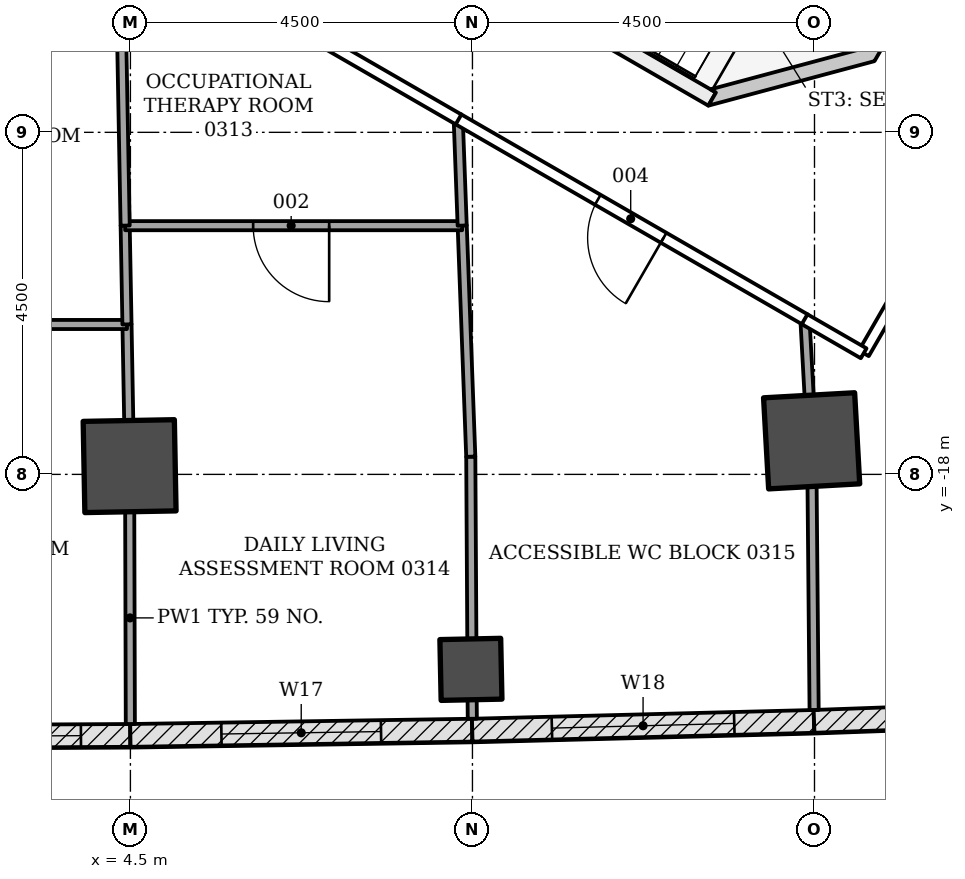
"""IFC4 building model, lengths in metres.
Left out: names, types, materials, properties, quantities, classifications, styles, units other than length and angle.
Written with IfcOpenShell. Run it as: python <this file> out.ifc"""

import sys

from ifc_helpers import new_model, si_unit, direction, frame, frame_2d, origin, origin_2d, place, context, subcontext, project, spatial, polyline, rectangle, outline, extrude, element, fill, save


model = new_model("IFC4")
c1 = context("Model", 3, precision=1e-05, world=origin(), true_north=direction((0.0, 1.0)))
c2 = subcontext(c1, "Body", "Model", "MODEL_VIEW")
j1 = project(units=[si_unit("LENGTHUNIT", "METRE"), si_unit("PLANEANGLEUNIT", "RADIAN")], contexts=[c1])
p1 = place(None, origin())
s1 = spatial("IfcSite", under=j1, at=p1, CompositionType="ELEMENT")
p2 = place(p1, origin())
s2 = spatial("IfcBuilding", under=s1, at=p2, CompositionType="ELEMENT")
p3 = place(p2, frame((0.0, 0.0, 15.0)))
s3 = spatial("IfcBuildingStorey", under=s2, at=p3, CompositionType="ELEMENT", Elevation=15.0)
for number, where, z_axis, x_axis in (
    (1, (4.49, -17.892, -0.25), (0.0, 0.0, 1.0), (0.019, -1.0, 0.0)),
    (2, (13.462, -17.558, -0.25), (0.0, 0.0, 1.0), (0.056, -0.998, 0.0)),
):
    element("IfcColumn", number, at=place(p3, frame(where, z_axis=z_axis, x_axis=x_axis)), inside=s3, PredefinedType="COLUMN", context=c2, shape_type="SweptSolid", body=[
        extrude(rectangle(XDim=1.2, YDim=1.2, at=origin_2d()), origin(), (0.0, 0.0, 1.0), 4.5),
    ])
p4 = place(p3, frame((8.98, -20.565, -0.25), z_axis=(0.0, 0.0, 1.0), x_axis=(0.020537122929, -0.99978909105, 0.0)))
e3 = element("IfcColumn", 3, at=p4, inside=s3, PredefinedType="COLUMN", context=c2, shape_type="SweptSolid", body=[
    extrude(rectangle(XDim=0.8, YDim=0.8, at=origin_2d()), origin(), (0.0, 0.0, 1.0), 4.5),
])
p5 = place(p3, frame((9.922, -5.728, -0.25), z_axis=(0.0, 0.0, 1.0), x_axis=(0.866028046028, -0.499995423472, 0.0)))
e4 = element("IfcWall", 4, at=p5, inside=s3, PredefinedType="SHEAR", context=c2, shape_type="SweptSolid", body=[
    extrude(rectangle(XDim=14.633, YDim=0.9, at=frame_2d((7.316, 0.0))), origin(), (0.0, 0.0, 1.0), 4.5),
])
p6 = place(p5, frame((7.35, 0.0, 0.25)))
e5 = element("IfcOpeningElement", 5, at=p6, cuts=e4, PredefinedType="OPENING", context=c2, shape_type="SweptSolid", body=[
    extrude(rectangle(XDim=1.5, YDim=2.1, at=frame_2d((0.75, 1.05))), frame((0.0, 0.46, 0.0), z_axis=(0.0, -1.0, 0.0), x_axis=(1.0, 0.0, 0.0)), (0.0, 0.0, 1.0), 0.92),
])
p7 = place(p3, frame((4.497, -21.434, 0.0), z_axis=(0.0, 0.0, 1.0), x_axis=(-0.999986693461, -0.005158769258, 0.0)))
e6 = element("IfcWall", 6, at=p7, inside=s3, PredefinedType="NOTDEFINED", context=c2, shape_type="SweptSolid", body=[
    extrude(rectangle(XDim=4.496, YDim=0.3, at=frame_2d((2.248, 0.0))), origin(), (0.0, 0.0, 1.0), 4.25),
])
p8 = place(p7, frame((0.648, 0.0, 0.8)))
e7 = element("IfcOpeningElement", 7, at=p8, cuts=e6, PredefinedType="OPENING", context=c2, shape_type="SweptSolid", body=[
    extrude(rectangle(XDim=3.2, YDim=2.7, at=frame_2d((1.6, 1.35))), frame((0.0, 0.16, 0.0), z_axis=(0.0, -1.0, 0.0), x_axis=(1.0, 0.0, 0.0)), (0.0, 0.0, 1.0), 0.32),
])
p9 = place(p3, frame((8.995, -21.365, 0.0), z_axis=(0.0, 0.0, 1.0), x_axis=(-0.999881921814, -0.015366926462, 0.0)))
e8 = element("IfcWall", 8, at=p9, inside=s3, PredefinedType="NOTDEFINED", context=c2, shape_type="SweptSolid", body=[
    extrude(rectangle(XDim=4.496, YDim=0.3, at=frame_2d((2.248, 0.0))), origin(), (0.0, 0.0, 1.0), 4.25),
])
p10 = place(p9, frame((1.198, 0.0, 0.8)))
e9 = element("IfcOpeningElement", 9, at=p10, cuts=e8, PredefinedType="OPENING", context=c2, shape_type="SweptSolid", body=[
    extrude(rectangle(XDim=2.1, YDim=3.0, at=frame_2d((1.05, 1.5))), frame((0.0, 0.16, 0.0), z_axis=(0.0, -1.0, 0.0), x_axis=(1.0, 0.0, 0.0)), (0.0, 0.0, 1.0), 0.32),
])
p11 = place(p3, frame((13.492, -21.25, 0.0), z_axis=(0.0, 0.0, 1.0), x_axis=(-0.999671466587, -0.025631209312, 0.0)))
e10 = element("IfcWall", 10, at=p11, inside=s3, PredefinedType="NOTDEFINED", context=c2, shape_type="SweptSolid", body=[
    extrude(rectangle(XDim=4.496, YDim=0.3, at=frame_2d((2.248, 0.0))), origin(), (0.0, 0.0, 1.0), 4.25),
])
p12 = place(p11, frame((1.048, 0.0, 0.9)))
e11 = element("IfcOpeningElement", 11, at=p12, cuts=e10, PredefinedType="OPENING", context=c2, shape_type="SweptSolid", body=[
    extrude(rectangle(XDim=2.4, YDim=2.4, at=frame_2d((1.2, 1.2))), frame((0.0, 0.16, 0.0), z_axis=(0.0, -1.0, 0.0), x_axis=(1.0, 0.0, 0.0)), (0.0, 0.0, 1.0), 0.32),
])
p13 = place(p3, frame((17.988, -21.088, 0.0), z_axis=(0.0, 0.0, 1.0), x_axis=(-0.999355640029, -0.035892962294, 0.0)))
e12 = element("IfcWall", 12, at=p13, inside=s3, PredefinedType="NOTDEFINED", context=c2, shape_type="SweptSolid", body=[
    extrude(rectangle(XDim=4.496, YDim=0.3, at=frame_2d((2.248, 0.0))), origin(), (0.0, 0.0, 1.0), 4.25),
])
p14 = place(p13, frame((1.048, 0.0, 0.9)))
e13 = element("IfcOpeningElement", 13, at=p14, cuts=e12, PredefinedType="OPENING", context=c2, shape_type="SweptSolid", body=[
    extrude(rectangle(XDim=2.4, YDim=2.4, at=frame_2d((1.2, 1.2))), frame((0.0, 0.16, 0.0), z_axis=(0.0, -1.0, 0.0), x_axis=(1.0, 0.0, 0.0)), (0.0, 0.0, 1.0), 0.32),
])
p15 = place(p3, frame((7.304, -10.262, -0.25), z_axis=(0.0, 0.0, 1.0), x_axis=(0.866026594901, -0.49999793692, 0.0)))
e14 = element("IfcWall", 14, at=p15, inside=s3, PredefinedType="SHEAR", context=c2, shape_type="SweptSolid", body=[
    extrude(rectangle(XDim=5.6, YDim=0.2, at=frame_2d((2.8, 0.0))), origin(), (0.0, 0.0, 1.0), 4.5),
])
p16 = place(p15, frame((0.45, 0.0, 0.25)))
e15 = element("IfcOpeningElement", 15, at=p16, cuts=e14, PredefinedType="OPENING", context=c2, shape_type="SweptSolid", body=[
    extrude(rectangle(XDim=1.2, YDim=2.1, at=frame_2d((0.6, 1.05))), frame((0.0, 0.11, 0.0), z_axis=(0.0, -1.0, 0.0), x_axis=(1.0, 0.0, 0.0)), (0.0, 0.0, 1.0), 0.22),
])
p17 = place(p3, frame((0.0, 0.0, -0.25)))
e16 = element("IfcWall", 16, at=p17, inside=s3, PredefinedType="SHEAR", context=c2, shape_type="SweptSolid", body=[
    extrude(outline(polyline([(12.104, -13.149), (14.289, -12.563), (15.364, -10.701), (15.191, -10.601), (14.157, -12.392), (12.132, -12.934), (12.204, -12.976), (12.204, -12.976), (12.204, -12.976), (12.204, -12.976), (12.204, -12.976), (12.204, -12.976), (12.204, -12.976), (12.204, -12.976), (12.204, -12.976), (12.204, -12.976), (12.204, -12.976), (12.204, -12.976), (12.204, -12.976), (12.204, -12.976), (12.204, -12.976), (12.204, -12.976), (12.204, -12.976), (12.104, -13.149)])), origin(), (0.0, 0.0, 1.0), 4.5),
])
p18 = place(p3, frame((4.478, -17.291, 0.0), z_axis=(0.0, 0.0, 1.0), x_axis=(-0.018108783452, 0.999836022537, 0.0)))
e17 = element("IfcWall", 17, at=p18, inside=s3, PredefinedType="PARTITIONING", context=c2, shape_type="SweptSolid", body=[
    extrude(rectangle(XDim=1.267, YDim=0.12, at=frame_2d((0.634, 0.0))), origin(), (0.0, 0.0, 1.0), 3.638),
])
p19 = place(p3, frame((4.499, -21.284, 0.0), z_axis=(0.0, 0.0, 1.0), x_axis=(-0.00288561233, 0.999995836612, 0.0)))
e18 = element("IfcWall", 18, at=p19, inside=s3, PredefinedType="PARTITIONING", context=c2, shape_type="SweptSolid", body=[
    extrude(rectangle(XDim=2.792, YDim=0.12, at=frame_2d((1.396, 0.0))), origin(), (0.0, 0.0, 1.0), 3.633),
])
p20 = place(p3, frame((4.455, -16.028, 0.0), z_axis=(0.0, 0.0, 1.0), x_axis=(-1.0, 0.0, 0.0)))
e19 = element("IfcWall", 19, at=p20, inside=s3, PredefinedType="PARTITIONING", context=c2, shape_type="SweptSolid", body=[
    extrude(rectangle(XDim=4.455, YDim=0.12, at=frame_2d((2.228, 0.0))), origin(), (0.0, 0.0, 1.0), 3.638),
])
p21 = place(p20, frame((1.75, 0.0, 0.0)))
e20 = element("IfcOpeningElement", 20, at=p21, cuts=e19, PredefinedType="OPENING", context=c2, shape_type="SweptSolid", body=[
    extrude(rectangle(XDim=1.0, YDim=2.1, at=frame_2d((0.5, 1.05))), frame((0.0, 0.07, 0.0), z_axis=(0.0, -1.0, 0.0), x_axis=(1.0, 0.0, 0.0)), (0.0, 0.0, 1.0), 0.14),
])
p22 = place(p3, frame((8.992, -20.165, 0.0), z_axis=(0.0, 0.0, 1.0), x_axis=(-0.005803200997, 0.999983161287, 0.0)))
e21 = element("IfcWall", 21, at=p22, inside=s3, PredefinedType="PARTITIONING", context=c2, shape_type="SweptSolid", body=[
    extrude(rectangle(XDim=2.398, YDim=0.12, at=frame_2d((1.199, 0.0))), origin(), (0.0, 0.0, 1.0), 3.638),
])
p23 = place(p3, frame((8.978, -17.767, 0.0), z_axis=(0.0, 0.0, 1.0), x_axis=(-0.037121380275, 0.99931076404, 0.0)))
e22 = element("IfcWall", 22, at=p23, inside=s3, PredefinedType="PARTITIONING", context=c2, shape_type="SweptSolid", body=[
    extrude(rectangle(XDim=3.045, YDim=0.12, at=frame_2d((1.522, 0.0))), origin(), (0.0, 0.0, 1.0), 3.638),
])
p24 = place(p3, frame((8.998, -21.215, 0.0), z_axis=(0.0, 0.0, 1.0), x_axis=(-0.007812261592, 0.999969483819, 0.0)))
e23 = element("IfcWall", 23, at=p24, inside=s3, PredefinedType="PARTITIONING", context=c2, shape_type="SweptSolid", body=[
    extrude(rectangle(XDim=0.25, YDim=0.12, at=frame_2d((0.125, 0.0))), origin(), (0.0, 0.0, 1.0), 4.25),
])
p25 = place(p3, frame((4.431, -14.724, 0.0), z_axis=(0.0, 0.0, 1.0), x_axis=(0.018546556452, -0.99982799783, 0.0)))
e24 = element("IfcWall", 24, at=p25, inside=s3, PredefinedType="PARTITIONING", context=c2, shape_type="SweptSolid", body=[
    extrude(rectangle(XDim=1.303, YDim=0.12, at=frame_2d((0.652, 0.0))), origin(), (0.0, 0.0, 1.0), 3.638),
])
p26 = place(p3, frame((8.865, -14.728, 0.0), z_axis=(0.0, 0.0, 1.0), x_axis=(-1.0, 0.0, 0.0)))
e25 = element("IfcWall", 25, at=p26, inside=s3, PredefinedType="PARTITIONING", context=c2, shape_type="SweptSolid", body=[
    extrude(rectangle(XDim=4.434, YDim=0.12, at=frame_2d((2.217, 0.0))), origin(), (0.0, 0.0, 1.0), 3.638),
])
p27 = place(p26, frame((1.75, 0.0, 0.0)))
e26 = element("IfcOpeningElement", 26, at=p27, cuts=e25, PredefinedType="OPENING", context=c2, shape_type="SweptSolid", body=[
    extrude(rectangle(XDim=1.0, YDim=2.1, at=frame_2d((0.5, 1.05))), frame((0.0, 0.07, 0.0), z_axis=(0.0, -1.0, 0.0), x_axis=(1.0, 0.0, 0.0)), (0.0, 0.0, 1.0), 0.14),
])
p28 = place(p3, frame((13.429, -16.959, 0.0), z_axis=(0.0, 0.0, 1.0), x_axis=(-0.055063393043, 0.998482860517, 0.0)))
e27 = element("IfcWall", 27, at=p28, inside=s3, PredefinedType="PARTITIONING", context=c2, shape_type="SweptSolid", body=[
    extrude(rectangle(XDim=0.998, YDim=0.12, at=frame_2d((0.499, 0.0))), origin(), (0.0, 0.0, 1.0), 3.638),
])
p29 = place(p3, frame((13.495, -21.099, 0.0), z_axis=(0.0, 0.0, 1.0), x_axis=(-0.009216581037, 0.999957526415, 0.0)))
e28 = element("IfcWall", 28, at=p29, inside=s3, PredefinedType="PARTITIONING", context=c2, shape_type="SweptSolid", body=[
    extrude(rectangle(XDim=2.94, YDim=0.12, at=frame_2d((1.47, 0.0))), origin(), (0.0, 0.0, 1.0), 3.633),
])
p30 = place(p3, frame((8.813, -13.328, 0.0), z_axis=(0.0, 0.0, 1.0), x_axis=(0.037140645658, -0.999310048203, 0.0)))
e29 = element("IfcWall", 29, at=p30, inside=s3, PredefinedType="PARTITIONING", context=c2, shape_type="SweptSolid", body=[
    extrude(rectangle(XDim=1.4, YDim=0.12, at=frame_2d((0.7, 0.0))), origin(), (0.0, 0.0, 1.0), 3.638),
])
p31 = place(p3, frame((13.377, -15.962, 0.0), z_axis=(0.0, 0.0, 1.0), x_axis=(-0.866049926484, 0.499957523033, 0.0)))
e30 = element("IfcWall", 30, at=p31, inside=s3, PredefinedType="PARTITIONING", context=c2, shape_type="SweptSolid", body=[
    extrude(rectangle(XDim=5.274, YDim=0.15, at=frame_2d((2.637, 0.0))), origin(), (0.0, 0.0, 1.0), 3.638),
])
p32 = place(p31, frame((2.15, 0.0, 0.0)))
e31 = element("IfcOpeningElement", 31, at=p32, cuts=e30, PredefinedType="OPENING", context=c2, shape_type="SweptSolid", body=[
    extrude(rectangle(XDim=1.0, YDim=2.1, at=frame_2d((0.5, 1.05))), frame((0.0, 0.085, 0.0), z_axis=(0.0, -1.0, 0.0), x_axis=(1.0, 0.0, 0.0)), (0.0, 0.0, 1.0), 0.17),
])
p33 = place(p3, frame((17.491, -10.618, 0.0), z_axis=(0.0, 0.0, 1.0), x_axis=(-0.499969057507, -0.866043267704, 0.0)))
e32 = element("IfcWall", 32, at=p33, inside=s3, PredefinedType="PARTITIONING", context=c2, shape_type="SweptSolid", body=[
    extrude(rectangle(XDim=6.685, YDim=0.15, at=frame_2d((3.342, 0.0))), origin(), (0.0, 0.0, 1.0), 3.638),
])
p34 = place(p33, frame((2.45, 0.0, 0.0)))
e33 = element("IfcOpeningElement", 33, at=p34, cuts=e32, PredefinedType="OPENING", context=c2, shape_type="SweptSolid", body=[
    extrude(rectangle(XDim=1.8, YDim=2.1, at=frame_2d((0.9, 1.05))), frame((0.0, 0.085, 0.0), z_axis=(0.0, -1.0, 0.0), x_axis=(1.0, 0.0, 0.0)), (0.0, 0.0, 1.0), 0.17),
])
p35 = place(p3, frame((14.147, -16.407, 0.0), z_axis=(0.0, 0.0, 1.0), x_axis=(-0.866276218641, 0.499565324075, 0.0)))
e34 = element("IfcWall", 34, at=p35, inside=s3, PredefinedType="PARTITIONING", context=c2, shape_type="SweptSolid", body=[
    extrude(rectangle(XDim=0.897, YDim=0.15, at=frame_2d((0.448, 0.0))), origin(), (0.0, 0.0, 1.0), 3.638),
])
p36 = place(p3, frame((4.431, -14.727, 0.0), z_axis=(0.0, 0.0, 1.0), x_axis=(-0.018571065409, 0.999827542894, 0.0)))
e35 = element("IfcWall", 35, at=p36, inside=s3, PredefinedType="PARTITIONING", context=c2, shape_type="SweptSolid", body=[
    extrude(rectangle(XDim=4.299, YDim=0.12, at=frame_2d((2.149, 0.0))), origin(), (0.0, 0.0, 1.0), 3.638),
])
p37 = place(p3, frame((8.817, -13.33, 0.0), z_axis=(0.0, 0.0, 1.0), x_axis=(-0.865999736111, 0.50004445508, 0.0)))
e36 = element("IfcWall", 36, at=p37, inside=s3, PredefinedType="PARTITIONING", context=c2, shape_type="SweptSolid", body=[
    extrude(rectangle(XDim=2.844, YDim=0.15, at=frame_2d((1.422, 0.0))), origin(), (0.0, 0.0, 1.0), 3.638),
])
p38 = place(p8, origin())
e37 = element("IfcWindow", 37, at=p38, inside=s3, PartitioningType="TRIPLE_PANEL_VERTICAL", PredefinedType="WINDOW", context=c2, shape_type="SweptSolid", body=[
    extrude(rectangle(XDim=3.2, YDim=2.7, at=frame_2d((1.6, 1.35))), frame((0.0, 0.03, 0.0), z_axis=(0.0, -1.0, 0.0), x_axis=(1.0, 0.0, 0.0)), (0.0, 0.0, 1.0), 0.06),
])
fill(e7, e37)
p39 = place(p10, origin())
e38 = element("IfcWindow", 38, at=p39, inside=s3, PartitioningType="DOUBLE_PANEL_HORIZONTAL", PredefinedType="WINDOW", context=c2, shape_type="SweptSolid", body=[
    extrude(rectangle(XDim=2.1, YDim=3.0, at=frame_2d((1.05, 1.5))), frame((0.0, 0.03, 0.0), z_axis=(0.0, -1.0, 0.0), x_axis=(1.0, 0.0, 0.0)), (0.0, 0.0, 1.0), 0.06),
])
fill(e9, e38)
p40 = place(p12, origin())
e39 = element("IfcWindow", 39, at=p40, inside=s3, PartitioningType="DOUBLE_PANEL_VERTICAL", PredefinedType="WINDOW", context=c2, shape_type="SweptSolid", body=[
    extrude(rectangle(XDim=2.4, YDim=2.4, at=frame_2d((1.2, 1.2))), frame((0.0, 0.03, 0.0), z_axis=(0.0, -1.0, 0.0), x_axis=(1.0, 0.0, 0.0)), (0.0, 0.0, 1.0), 0.06),
])
fill(e11, e39)
p41 = place(p27, origin())
e40 = element("IfcDoor", 40, at=p41, inside=s3, OperationType="SINGLE_SWING_RIGHT", PredefinedType="DOOR", context=c2, shape_type="SweptSolid", body=[
    extrude(rectangle(XDim=1.0, YDim=2.1, at=frame_2d((0.5, 1.05))), frame((0.0, 0.025, 0.0), z_axis=(0.0, -1.0, 0.0), x_axis=(1.0, 0.0, 0.0)), (0.0, 0.0, 1.0), 0.05),
])
fill(e26, e40)
p42 = place(p32, origin())
e41 = element("IfcDoor", 41, at=p42, inside=s3, OperationType="SINGLE_SWING_RIGHT", PredefinedType="DOOR", context=c2, shape_type="SweptSolid", body=[
    extrude(rectangle(XDim=1.0, YDim=2.1, at=frame_2d((0.5, 1.05))), frame((0.0, 0.025, 0.0), z_axis=(0.0, -1.0, 0.0), x_axis=(1.0, 0.0, 0.0)), (0.0, 0.0, 1.0), 0.05),
])
fill(e31, e41)
save(model, sys.argv[1])
